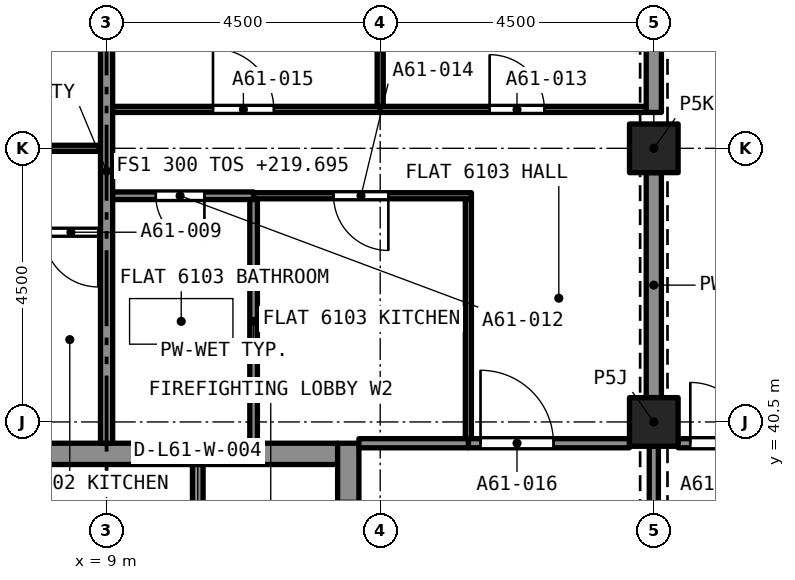
"""IFC4 building model, lengths in metres.
Left out: names, types, materials, properties, quantities, classifications, styles, units other than length and angle.
Written with IfcOpenShell. Run it as: python <this file> out.ifc"""

import sys

from ifc_helpers import new_model, si_unit, direction, frame, frame_2d, origin, origin_2d, place, context, subcontext, project, spatial, rectangle, extrude, element, fill, save


model = new_model("IFC4")
c1 = context("Model", 3, precision=1e-05, world=origin(), true_north=direction((0.0, 1.0)))
c2 = subcontext(c1, "Body", "Model", "MODEL_VIEW")
j1 = project(units=[si_unit("LENGTHUNIT", "METRE"), si_unit("PLANEANGLEUNIT", "RADIAN")], contexts=[c1])
p1 = place(None, origin())
s1 = spatial("IfcSite", under=j1, at=p1, CompositionType="ELEMENT")
p2 = place(p1, origin())
s2 = spatial("IfcBuilding", under=s1, at=p2, CompositionType="ELEMENT")
p3 = place(p2, frame((0.0, 0.0, 219.695)))
s3 = spatial("IfcBuildingStorey", under=s2, at=p3, CompositionType="ELEMENT", Elevation=219.695)
for number, where, z_axis, x_axis in (
    (1, (18.0, 40.5, 0.0), (0.0, 0.0, 1.0), (1.0, 0.0, 0.0)),
    (2, (18.0, 45.0, 0.0), (0.0, 0.0, 1.0), (1.0, 0.0, 0.0)),
):
    element("IfcColumn", number, at=place(p3, frame(where, z_axis=z_axis, x_axis=x_axis)), inside=s3, PredefinedType="COLUMN", context=c2, shape_type="SweptSolid", body=[
        extrude(rectangle(XDim=0.8, YDim=0.8, at=origin_2d()), origin(), (0.0, 0.0, 1.0), 3.2),
    ])
p4 = place(p3, frame((5.2, 39.975, 0.0), z_axis=(0.0, 0.0, 1.0), x_axis=(1.0, 0.0, 0.0)))
e3 = element("IfcWall", 3, at=p4, inside=s3, PredefinedType="SOLIDWALL", context=c2, shape_type="SweptSolid", body=[
    extrude(rectangle(XDim=7.6, YDim=0.35, at=frame_2d((3.8, 0.0))), origin(), (0.0, 0.0, 1.0), 3.2),
])
p5 = place(p3, frame((12.975, 27.35, 0.0), z_axis=(0.0, 0.0, 1.0), x_axis=(0.0, 1.0, 0.0)))
e4 = element("IfcWall", 4, at=p5, inside=s3, PredefinedType="SOLIDWALL", context=c2, shape_type="SweptSolid", body=[
    extrude(rectangle(XDim=12.8, YDim=0.35, at=frame_2d((6.4, 0.0))), origin(), (0.0, 0.0, 1.0), 3.2),
])
p6 = place(p5, frame((10.75, 0.0, 0.0)))
e5 = element("IfcOpeningElement", 5, at=p6, cuts=e4, PredefinedType="OPENING", context=c2, shape_type="SweptSolid", body=[
    extrude(rectangle(XDim=1.1, YDim=2.1, at=frame_2d((0.55, 1.05))), frame((0.0, 0.185, 0.0), z_axis=(0.0, -1.0, 0.0), x_axis=(1.0, 0.0, 0.0)), (0.0, 0.0, 1.0), 0.37),
])
p7 = place(p5, frame((8.6, 0.0, 0.0)))
e6 = element("IfcOpeningElement", 6, at=p7, cuts=e4, PredefinedType="OPENING", context=c2, shape_type="SweptSolid", body=[
    extrude(rectangle(XDim=1.2, YDim=2.1, at=frame_2d((0.6, 1.05))), frame((0.0, 0.185, 0.0), z_axis=(0.0, -1.0, 0.0), x_axis=(1.0, 0.0, 0.0)), (0.0, 0.0, 1.0), 0.37),
])
p8 = place(p3, frame((4.5, 45.0, 0.0), z_axis=(0.0, 0.0, 1.0), x_axis=(1.0, 0.0, 0.0)))
e7 = element("IfcWall", 7, at=p8, inside=s3, PredefinedType="PARTITIONING", context=c2, shape_type="SweptSolid", body=[
    extrude(rectangle(XDim=4.4, YDim=0.1, at=frame_2d((2.2, 0.0))), origin(), (0.0, 0.0, 1.0), 2.9),
])
p9 = place(p8, frame((1.8, 0.0, 0.0)))
e8 = element("IfcOpeningElement", 8, at=p9, cuts=e7, PredefinedType="OPENING", context=c2, shape_type="SweptSolid", body=[
    extrude(rectangle(XDim=0.9, YDim=2.1, at=frame_2d((0.45, 1.05))), frame((0.0, 0.06, 0.0), z_axis=(0.0, -1.0, 0.0), x_axis=(1.0, 0.0, 0.0)), (0.0, 0.0, 1.0), 0.12),
])
p10 = place(p3, frame((8.9, 43.62, 0.0), z_axis=(0.0, 0.0, 1.0), x_axis=(-1.0, 0.0, 0.0)))
e9 = element("IfcWall", 9, at=p10, inside=s3, PredefinedType="PARTITIONING", context=c2, shape_type="SweptSolid", body=[
    extrude(rectangle(XDim=1.073, YDim=0.1, at=frame_2d((0.536, 0.0))), origin(), (0.0, 0.0, 1.0), 2.9),
])
p11 = place(p10, frame((0.036, 0.0, 0.0)))
e10 = element("IfcOpeningElement", 10, at=p11, cuts=e9, PredefinedType="OPENING", context=c2, shape_type="SweptSolid", body=[
    extrude(rectangle(XDim=0.9, YDim=2.1, at=frame_2d((0.45, 1.05))), frame((0.0, 0.06, 0.0), z_axis=(0.0, -1.0, 0.0), x_axis=(1.0, 0.0, 0.0)), (0.0, 0.0, 1.0), 0.12),
])
p12 = place(p3, frame((9.0, 40.15, 0.0), z_axis=(0.0, 0.0, 1.0), x_axis=(0.0, 1.0, 0.0)))
e11 = element("IfcWall", 11, at=p12, inside=s3, PredefinedType="PARTITIONING", context=c2, shape_type="SweptSolid", body=[
    extrude(rectangle(XDim=8.95, YDim=0.2, at=frame_2d((4.475, 0.0))), origin(), (0.0, 0.0, 1.0), 2.9),
])
p13 = place(p3, frame((11.418, 44.22, 0.0), z_axis=(0.0, 0.0, 1.0), x_axis=(-1.0, 0.0, 0.0)))
e12 = element("IfcWall", 12, at=p13, inside=s3, PredefinedType="PARTITIONING", context=c2, shape_type="SweptSolid", body=[
    extrude(rectangle(XDim=2.318, YDim=0.125, at=frame_2d((1.159, 0.0))), origin(), (0.0, 0.0, 1.0), 2.9),
])
p14 = place(p13, frame((0.809, 0.0, 0.0)))
e13 = element("IfcOpeningElement", 13, at=p14, cuts=e12, PredefinedType="OPENING", context=c2, shape_type="SweptSolid", body=[
    extrude(rectangle(XDim=0.8, YDim=2.1, at=frame_2d((0.4, 1.05))), frame((0.0, 0.073, 0.0), z_axis=(0.0, -1.0, 0.0), x_axis=(1.0, 0.0, 0.0)), (0.0, 0.0, 1.0), 0.145),
])
p15 = place(p3, frame((11.418, 40.15, 0.0), z_axis=(0.0, 0.0, 1.0), x_axis=(0.0, 1.0, 0.0)))
e14 = element("IfcWall", 14, at=p15, inside=s3, PredefinedType="PARTITIONING", context=c2, shape_type="SweptSolid", body=[
    extrude(rectangle(XDim=4.008, YDim=0.125, at=frame_2d((2.004, 0.0))), origin(), (0.0, 0.0, 1.0), 2.9),
])
p16 = place(p3, frame((13.5, 45.64, 0.0), z_axis=(0.0, 0.0, 1.0), x_axis=(1.0, 0.0, 0.0)))
e15 = element("IfcWall", 15, at=p16, inside=s3, PredefinedType="PARTITIONING", context=c2, shape_type="SweptSolid", body=[
    extrude(rectangle(XDim=4.375, YDim=0.1, at=frame_2d((2.188, 0.0))), origin(), (0.0, 0.0, 1.0), 2.9),
])
p17 = place(p16, frame((1.8, 0.0, 0.0)))
e16 = element("IfcOpeningElement", 16, at=p17, cuts=e15, PredefinedType="OPENING", context=c2, shape_type="SweptSolid", body=[
    extrude(rectangle(XDim=0.9, YDim=2.1, at=frame_2d((0.45, 1.05))), frame((0.0, 0.06, 0.0), z_axis=(0.0, -1.0, 0.0), x_axis=(1.0, 0.0, 0.0)), (0.0, 0.0, 1.0), 0.12),
])
p18 = place(p3, frame((13.5, 45.69, 0.0), z_axis=(0.0, 0.0, 1.0), x_axis=(0.0, 1.0, 0.0)))
e17 = element("IfcWall", 17, at=p18, inside=s3, PredefinedType="PARTITIONING", context=c2, shape_type="SweptSolid", body=[
    extrude(rectangle(XDim=3.41, YDim=0.1, at=frame_2d((1.705, 0.0))), origin(), (0.0, 0.0, 1.0), 2.9),
])
p19 = place(p3, frame((18.0, 45.59, 0.0), z_axis=(0.0, 0.0, 1.0), x_axis=(0.0, 1.0, 0.0)))
e18 = element("IfcWall", 18, at=p19, inside=s3, PredefinedType="PARTITIONING", context=c2, shape_type="SweptSolid", body=[
    extrude(rectangle(XDim=3.51, YDim=0.25, at=frame_2d((1.755, 0.0))), origin(), (0.0, 0.0, 1.0), 2.38),
])
p20 = place(p3, frame((14.95, 40.225, 0.0), z_axis=(0.0, 0.0, 1.0), x_axis=(0.0, 1.0, 0.0)))
e19 = element("IfcWall", 19, at=p20, inside=s3, PredefinedType="PARTITIONING", context=c2, shape_type="SweptSolid", body=[
    extrude(rectangle(XDim=3.945, YDim=0.1, at=frame_2d((1.972, 0.0))), origin(), (0.0, 0.0, 1.0), 2.9),
])
p21 = place(p3, frame((15.0, 44.22, 0.0), z_axis=(0.0, 0.0, 1.0), x_axis=(-1.0, 0.0, 0.0)))
e20 = element("IfcWall", 20, at=p21, inside=s3, PredefinedType="PARTITIONING", context=c2, shape_type="SweptSolid", body=[
    extrude(rectangle(XDim=3.582, YDim=0.1, at=frame_2d((1.791, 0.0))), origin(), (0.0, 0.0, 1.0), 2.9),
])
p22 = place(p21, frame((1.366, 0.0, 0.0)))
e21 = element("IfcOpeningElement", 21, at=p22, cuts=e20, PredefinedType="OPENING", context=c2, shape_type="SweptSolid", body=[
    extrude(rectangle(XDim=0.9, YDim=2.1, at=frame_2d((0.45, 1.05))), frame((0.0, 0.06, 0.0), z_axis=(0.0, -1.0, 0.0), x_axis=(1.0, 0.0, 0.0)), (0.0, 0.0, 1.0), 0.12),
])
p23 = place(p3, frame((9.1, 45.64, 0.0), z_axis=(0.0, 0.0, 1.0), x_axis=(1.0, 0.0, 0.0)))
e22 = element("IfcWall", 22, at=p23, inside=s3, PredefinedType="PARTITIONING", context=c2, shape_type="SweptSolid", body=[
    extrude(rectangle(XDim=4.4, YDim=0.1, at=frame_2d((2.2, 0.0))), origin(), (0.0, 0.0, 1.0), 2.9),
])
p24 = place(p23, frame((1.65, 0.0, 0.0)))
e23 = element("IfcOpeningElement", 23, at=p24, cuts=e22, PredefinedType="OPENING", context=c2, shape_type="SweptSolid", body=[
    extrude(rectangle(XDim=1.0, YDim=2.1, at=frame_2d((0.5, 1.05))), frame((0.0, 0.06, 0.0), z_axis=(0.0, -1.0, 0.0), x_axis=(1.0, 0.0, 0.0)), (0.0, 0.0, 1.0), 0.12),
])
p25 = place(p3, frame((18.0, 40.9, 0.0), z_axis=(0.0, 0.0, 1.0), x_axis=(0.0, 1.0, 0.0)))
e24 = element("IfcWall", 24, at=p25, inside=s3, PredefinedType="PARTITIONING", context=c2, shape_type="SweptSolid", body=[
    extrude(rectangle(XDim=3.7, YDim=0.25, at=frame_2d((1.85, 0.0))), origin(), (0.0, 0.0, 1.0), 2.38),
])
p26 = place(p3, frame((14.95, 40.15, 0.0), z_axis=(0.0, 0.0, 1.0), x_axis=(1.0, 0.0, 0.0)))
e25 = element("IfcWall", 25, at=p26, inside=s3, PredefinedType="PARTITIONING", context=c2, shape_type="SweptSolid", body=[
    extrude(rectangle(XDim=2.65, YDim=0.15, at=frame_2d((1.325, 0.0))), origin(), (0.0, 0.0, 1.0), 2.9),
])
p27 = place(p26, frame((0.2, 0.0, 0.0)))
e26 = element("IfcOpeningElement", 26, at=p27, cuts=e25, PredefinedType="OPENING", context=c2, shape_type="SweptSolid", body=[
    extrude(rectangle(XDim=1.2, YDim=2.4, at=frame_2d((0.6, 1.2))), frame((0.0, 0.085, 0.0), z_axis=(0.0, -1.0, 0.0), x_axis=(1.0, 0.0, 0.0)), (0.0, 0.0, 1.0), 0.17),
])
p28 = place(p3, frame((13.15, 40.15, 0.0), z_axis=(0.0, 0.0, 1.0), x_axis=(1.0, 0.0, 0.0)))
e27 = element("IfcWall", 27, at=p28, inside=s3, PredefinedType="PARTITIONING", context=c2, shape_type="SweptSolid", body=[
    extrude(rectangle(XDim=1.8, YDim=0.15, at=frame_2d((0.9, 0.0))), origin(), (0.0, 0.0, 1.0), 2.9),
])
p29 = place(p3, frame((18.4, 40.15, 0.0), z_axis=(0.0, 0.0, 1.0), x_axis=(1.0, 0.0, 0.0)))
e28 = element("IfcWall", 28, at=p29, inside=s3, PredefinedType="PARTITIONING", context=c2, shape_type="SweptSolid", body=[
    extrude(rectangle(XDim=2.2, YDim=0.15, at=frame_2d((1.1, 0.0))), origin(), (0.0, 0.0, 1.0), 2.75),
])
p30 = place(p29, frame((0.2, 0.0, 0.0)))
e29 = element("IfcOpeningElement", 29, at=p30, cuts=e28, PredefinedType="OPENING", context=c2, shape_type="SweptSolid", body=[
    extrude(rectangle(XDim=1.0, YDim=2.1, at=frame_2d((0.5, 1.05))), frame((0.0, 0.085, 0.0), z_axis=(0.0, -1.0, 0.0), x_axis=(1.0, 0.0, 0.0)), (0.0, 0.0, 1.0), 0.17),
])
p31 = place(p3, frame((18.0, 40.1, 0.0), z_axis=(0.0, 0.0, 1.0), x_axis=(0.0, -1.0, 0.0)))
e30 = element("IfcWall", 30, at=p31, inside=s3, PredefinedType="PARTITIONING", context=c2, shape_type="SweptSolid", body=[
    extrude(rectangle(XDim=3.7, YDim=0.15, at=frame_2d((1.85, 0.0))), origin(), (0.0, 0.0, 1.0), 2.38),
])
p32 = place(p31, frame((1.25, 0.0, 0.0)))
e31 = element("IfcOpeningElement", 31, at=p32, cuts=e30, PredefinedType="OPENING", context=c2, shape_type="SweptSolid", body=[
    extrude(rectangle(XDim=1.2, YDim=2.1, at=frame_2d((0.6, 1.05))), frame((0.0, 0.085, 0.0), z_axis=(0.0, -1.0, 0.0), x_axis=(1.0, 0.0, 0.0)), (0.0, 0.0, 1.0), 0.17),
])
p33 = place(p3, frame((10.5, 37.5, 0.0), z_axis=(0.0, 0.0, 1.0), x_axis=(0.0, 1.0, 0.0)))
e32 = element("IfcWall", 32, at=p33, inside=s3, PredefinedType="SOLIDWALL", context=c2, shape_type="SweptSolid", body=[
    extrude(rectangle(XDim=2.3, YDim=0.175, at=frame_2d((1.15, 0.0))), origin(), (0.0, 0.0, 1.0), 2.9),
])
p34 = place(p33, frame((0.65, 0.0, 0.0)))
e33 = element("IfcOpeningElement", 33, at=p34, cuts=e32, PredefinedType="OPENING", context=c2, shape_type="SweptSolid", body=[
    extrude(rectangle(XDim=1.0, YDim=2.1, at=frame_2d((0.5, 1.05))), frame((0.0, 0.097, 0.0), z_axis=(0.0, -1.0, 0.0), x_axis=(1.0, 0.0, 0.0)), (0.0, 0.0, 1.0), 0.195),
])
p35 = place(p11, origin())
e34 = element("IfcDoor", 34, at=p35, inside=s3, OperationType="SINGLE_SWING_LEFT", PredefinedType="DOOR", context=c2, shape_type="SweptSolid", body=[
    extrude(rectangle(XDim=0.9, YDim=2.1, at=frame_2d((0.45, 1.05))), frame((0.0, 0.025, 0.0), z_axis=(0.0, -1.0, 0.0), x_axis=(1.0, 0.0, 0.0)), (0.0, 0.0, 1.0), 0.05),
])
fill(e10, e34)
p36 = place(p14, origin())
e35 = element("IfcDoor", 35, at=p36, inside=s3, OperationType="SINGLE_SWING_RIGHT", PredefinedType="DOOR", context=c2, shape_type="SweptSolid", body=[
    extrude(rectangle(XDim=0.8, YDim=2.1, at=frame_2d((0.4, 1.05))), frame((0.0, 0.025, 0.0), z_axis=(0.0, -1.0, 0.0), x_axis=(1.0, 0.0, 0.0)), (0.0, 0.0, 1.0), 0.05),
])
fill(e13, e35)
p37 = place(p17, origin())
e36 = element("IfcDoor", 36, at=p37, inside=s3, OperationType="SINGLE_SWING_RIGHT", PredefinedType="DOOR", context=c2, shape_type="SweptSolid", body=[
    extrude(rectangle(XDim=0.9, YDim=2.1, at=frame_2d((0.45, 1.05))), frame((0.0, 0.025, 0.0), z_axis=(0.0, -1.0, 0.0), x_axis=(1.0, 0.0, 0.0)), (0.0, 0.0, 1.0), 0.05),
])
fill(e16, e36)
p38 = place(p22, origin())
e37 = element("IfcDoor", 37, at=p38, inside=s3, OperationType="SINGLE_SWING_RIGHT", PredefinedType="DOOR", context=c2, shape_type="SweptSolid", body=[
    extrude(rectangle(XDim=0.9, YDim=2.1, at=frame_2d((0.45, 1.05))), frame((0.0, 0.025, 0.0), z_axis=(0.0, -1.0, 0.0), x_axis=(1.0, 0.0, 0.0)), (0.0, 0.0, 1.0), 0.05),
])
fill(e21, e37)
p39 = place(p24, origin())
e38 = element("IfcDoor", 38, at=p39, inside=s3, OperationType="SINGLE_SWING_LEFT", PredefinedType="DOOR", context=c2, shape_type="SweptSolid", body=[
    extrude(rectangle(XDim=1.0, YDim=2.1, at=frame_2d((0.5, 1.05))), frame((0.0, 0.025, 0.0), z_axis=(0.0, -1.0, 0.0), x_axis=(1.0, 0.0, 0.0)), (0.0, 0.0, 1.0), 0.05),
])
fill(e23, e38)
p40 = place(p27, origin())
e39 = element("IfcDoor", 39, at=p40, inside=s3, OperationType="SINGLE_SWING_LEFT", PredefinedType="DOOR", context=c2, shape_type="SweptSolid", body=[
    extrude(rectangle(XDim=1.2, YDim=2.4, at=frame_2d((0.6, 1.2))), frame((0.0, 0.025, 0.0), z_axis=(0.0, -1.0, 0.0), x_axis=(1.0, 0.0, 0.0)), (0.0, 0.0, 1.0), 0.05),
])
fill(e26, e39)
p41 = place(p30, origin())
e40 = element("IfcDoor", 40, at=p41, inside=s3, OperationType="SINGLE_SWING_LEFT", PredefinedType="DOOR", context=c2, shape_type="SweptSolid", body=[
    extrude(rectangle(XDim=1.0, YDim=2.1, at=frame_2d((0.5, 1.05))), frame((0.0, 0.025, 0.0), z_axis=(0.0, -1.0, 0.0), x_axis=(1.0, 0.0, 0.0)), (0.0, 0.0, 1.0), 0.05),
])
fill(e29, e40)
save(model, sys.argv[1])
